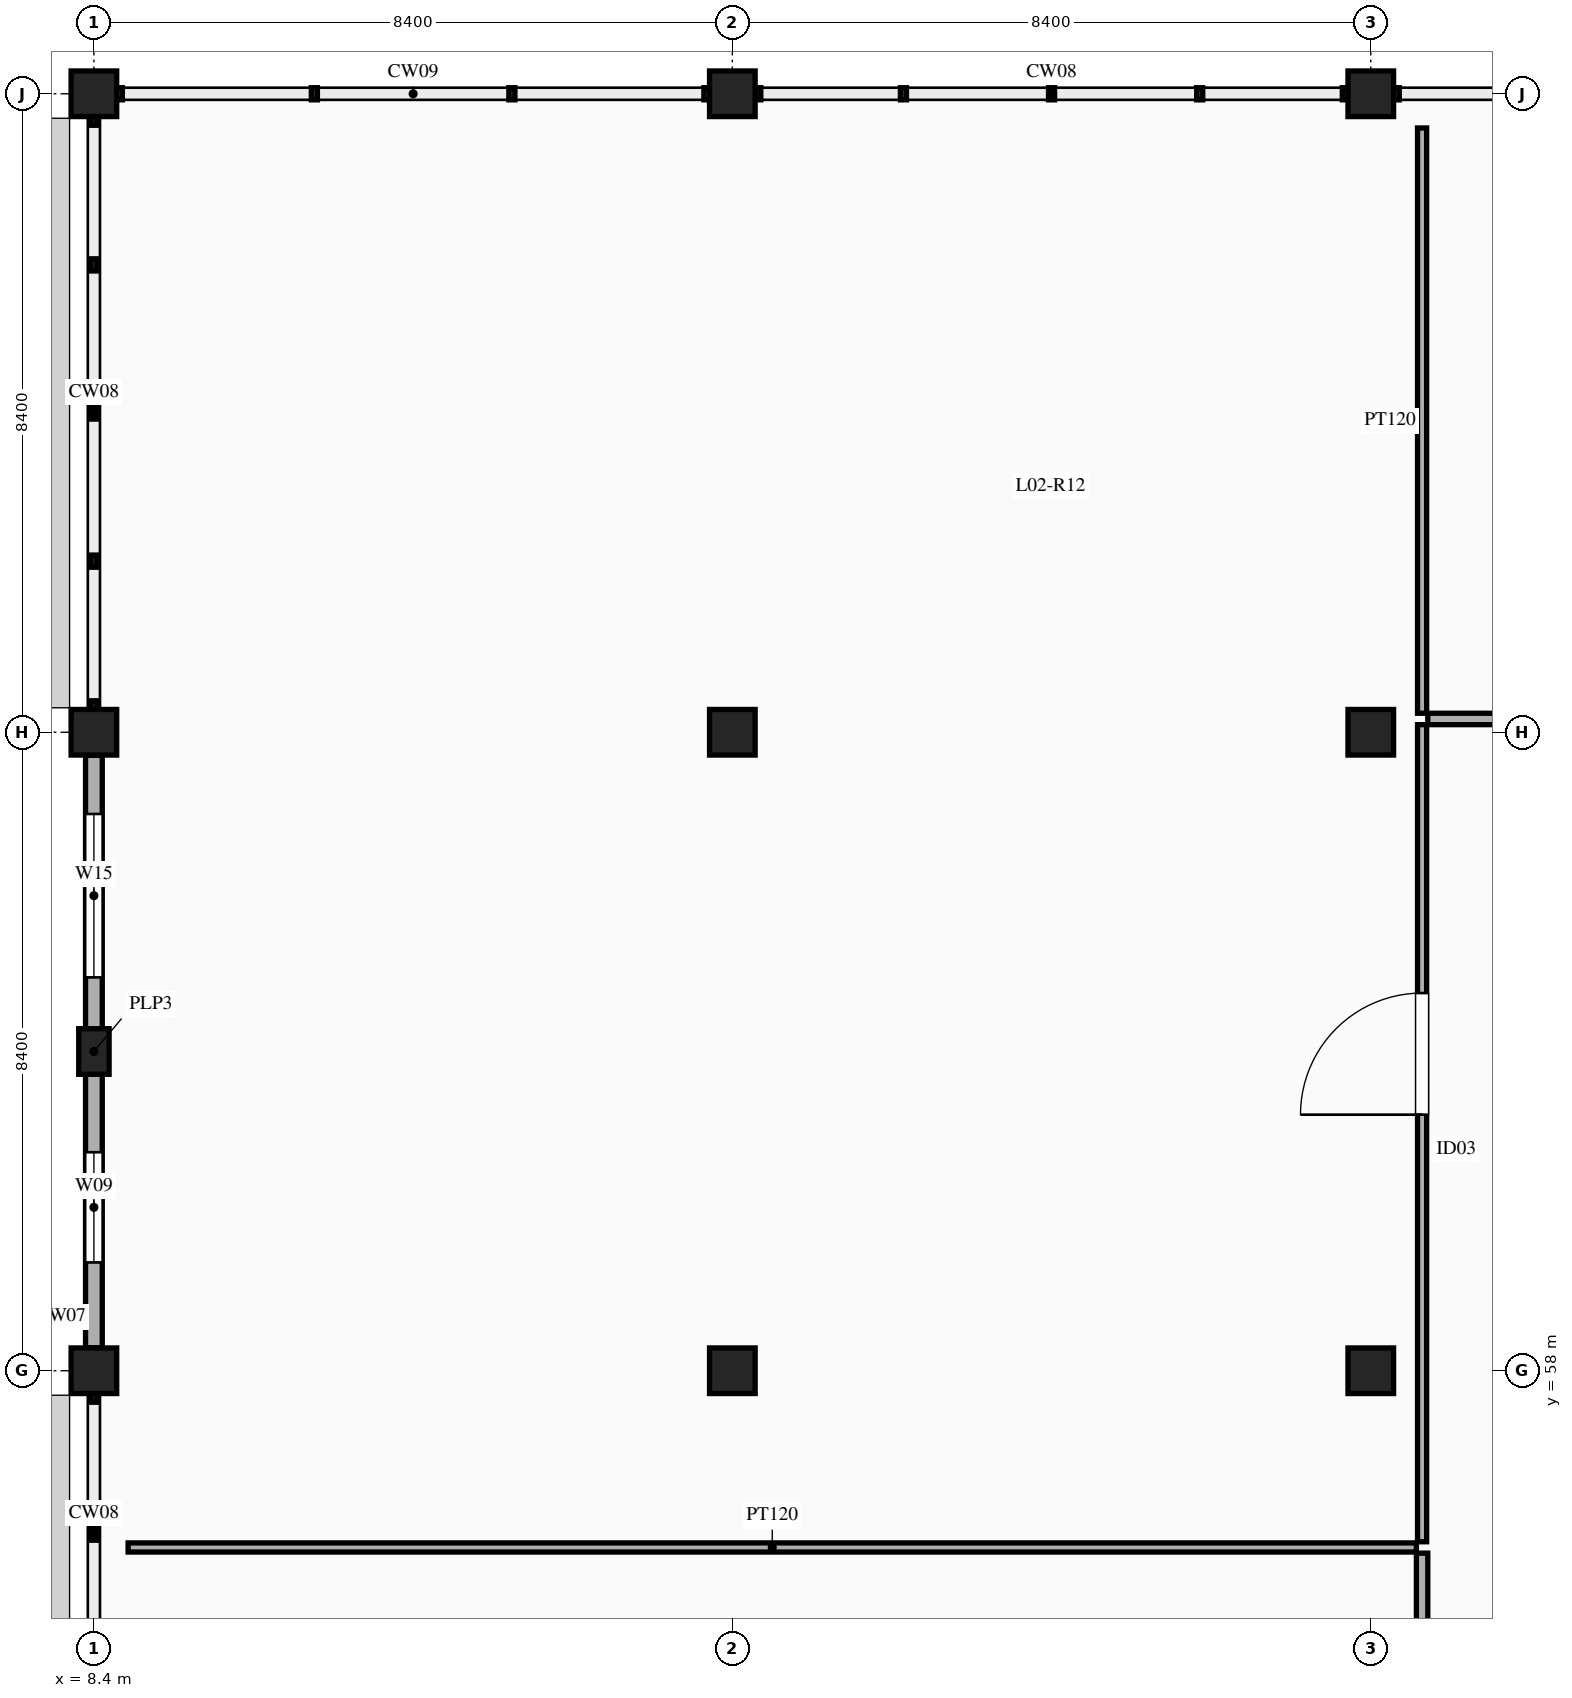
"""IFC4 building model, lengths in metres.
Left out: names, types, materials, properties, quantities, classifications, styles, units other than length and angle.
Written with IfcOpenShell. Run it as: python <this file> out.ifc"""

import sys

from ifc_helpers import new_model, si_unit, direction, frame, frame_2d, origin, origin_2d, place, context, subcontext, project, spatial, rectangle, extrude, element, fill, save


model = new_model("IFC4")
c1 = context("Model", 3, precision=1e-05, world=origin(), true_north=direction((0.0, 1.0)))
c2 = subcontext(c1, "Body", "Model", "MODEL_VIEW")
j1 = project(units=[si_unit("LENGTHUNIT", "METRE"), si_unit("PLANEANGLEUNIT", "RADIAN")], contexts=[c1])
p1 = place(None, origin())
s1 = spatial("IfcSite", under=j1, at=p1, CompositionType="ELEMENT")
p2 = place(p1, origin())
s2 = spatial("IfcBuilding", under=s1, at=p2, CompositionType="ELEMENT")
p3 = place(p2, frame((0.0, 0.0, 10.2)))
s3 = spatial("IfcBuildingStorey", under=s2, at=p3, CompositionType="ELEMENT", Elevation=10.2)
for number, where, z_axis, x_axis in (
    (1, (8.4, 58.0, 0.0), (0.0, 0.0, 1.0), (1.0, 0.0, 0.0)),
    (2, (8.4, 66.4, 0.0), (0.0, 0.0, 1.0), (1.0, 0.0, 0.0)),
    (3, (8.4, 74.8, 0.0), (0.0, 0.0, 1.0), (1.0, 0.0, 0.0)),
    (4, (16.8, 58.0, 0.0), (0.0, 0.0, 1.0), (1.0, 0.0, 0.0)),
    (5, (16.8, 66.4, 0.0), (0.0, 0.0, 1.0), (1.0, 0.0, 0.0)),
    (6, (16.8, 74.8, 0.0), (0.0, 0.0, 1.0), (1.0, 0.0, 0.0)),
    (7, (25.2, 58.0, 0.0), (0.0, 0.0, 1.0), (1.0, 0.0, 0.0)),
    (8, (25.2, 66.4, 0.0), (0.0, 0.0, 1.0), (1.0, 0.0, 0.0)),
    (9, (25.2, 74.8, 0.0), (0.0, 0.0, 1.0), (1.0, 0.0, 0.0)),
):
    element("IfcColumn", number, at=place(p3, frame(where, z_axis=z_axis, x_axis=x_axis)), inside=s3, PredefinedType="COLUMN", context=c2, shape_type="SweptSolid", body=[
        extrude(rectangle(XDim=0.6, YDim=0.6, at=origin_2d()), origin(), (0.0, 0.0, 1.0), 4.8),
    ])
p4 = place(p3, frame((8.4, 62.2, 0.0), z_axis=(0.0, 0.0, 1.0), x_axis=(1.0, 0.0, 0.0)))
e10 = element("IfcColumn", 10, at=p4, inside=s3, PredefinedType="PILASTER", context=c2, shape_type="SweptSolid", body=[
    extrude(rectangle(XDim=0.6, YDim=0.4, at=origin_2d()), origin(), (0.0, 0.0, 1.0), 4.8),
])
p5 = place(p3, frame((8.4, 58.302, 0.0), z_axis=(0.0, 0.0, 1.0), x_axis=(0.0, 1.0, 0.0)))
e11 = element("IfcWall", 11, at=p5, inside=s3, PredefinedType="USERDEFINED", context=c2, shape_type="SweptSolid", body=[
    extrude(rectangle(XDim=3.696, YDim=0.22, at=frame_2d((1.848, 0.0))), origin(), (0.0, 0.0, 1.0), 3.85),
])
p6 = place(p5, frame((1.123, 0.0, 0.9)))
e12 = element("IfcOpeningElement", 12, at=p6, cuts=e11, PredefinedType="OPENING", context=c2, shape_type="SweptSolid", body=[
    extrude(rectangle(XDim=1.45, YDim=1.8, at=frame_2d((0.725, 0.9))), frame((0.0, 0.12, 0.0), z_axis=(0.0, -1.0, 0.0), x_axis=(1.0, 0.0, 0.0)), (0.0, 0.0, 1.0), 0.24),
])
p7 = place(p3, frame((8.4, 62.402, 0.0), z_axis=(0.0, 0.0, 1.0), x_axis=(0.0, 1.0, 0.0)))
e13 = element("IfcWall", 13, at=p7, inside=s3, PredefinedType="USERDEFINED", context=c2, shape_type="SweptSolid", body=[
    extrude(rectangle(XDim=3.696, YDim=0.22, at=frame_2d((1.848, 0.0))), origin(), (0.0, 0.0, 1.0), 3.85),
])
p8 = place(p7, frame((0.773, 0.0, 1.1)))
e14 = element("IfcOpeningElement", 14, at=p8, cuts=e13, PredefinedType="OPENING", context=c2, shape_type="SweptSolid", body=[
    extrude(rectangle(XDim=2.15, YDim=2.15, at=frame_2d((1.075, 1.075))), frame((0.0, 0.12, 0.0), z_axis=(0.0, -1.0, 0.0), x_axis=(1.0, 0.0, 0.0)), (0.0, 0.0, 1.0), 0.24),
])
p9 = place(p3, frame((25.875, 36.95, 0.0), z_axis=(0.0, 0.0, 1.0), x_axis=(0.0, 1.0, 0.0)))
e15 = element("IfcWall", 15, at=p9, inside=s3, PredefinedType="PARTITIONING", context=c2, shape_type="SweptSolid", body=[
    extrude(rectangle(XDim=18.65, YDim=0.15, at=frame_2d((9.325, 0.0))), origin(), (0.0, 0.0, 1.0), 3.75),
])
p10 = place(p9, frame((15.963, 0.0, 0.0)))
e16 = element("IfcOpeningElement", 16, at=p10, cuts=e15, PredefinedType="OPENING", context=c2, shape_type="SweptSolid", body=[
    extrude(rectangle(XDim=1.24, YDim=2.2, at=frame_2d((0.62, 1.1))), frame((0.0, 0.085, 0.0), z_axis=(0.0, -1.0, 0.0), x_axis=(1.0, 0.0, 0.0)), (0.0, 0.0, 1.0), 0.17),
])
p11 = place(p3, frame((25.875, 55.75, 0.0), z_axis=(0.0, 0.0, 1.0), x_axis=(0.0, 1.0, 0.0)))
e17 = element("IfcWall", 17, at=p11, inside=s3, PredefinedType="PARTITIONING", context=c2, shape_type="SweptSolid", body=[
    extrude(rectangle(XDim=10.75, YDim=0.12, at=frame_2d((5.375, 0.0))), origin(), (0.0, 0.0, 1.0), 3.75),
])
p12 = place(p11, frame((5.619, 0.0, 0.0)))
e18 = element("IfcOpeningElement", 18, at=p12, cuts=e17, PredefinedType="OPENING", context=c2, shape_type="SweptSolid", body=[
    extrude(rectangle(XDim=1.6, YDim=2.35, at=frame_2d((0.8, 1.175))), frame((0.0, 0.07, 0.0), z_axis=(0.0, -1.0, 0.0), x_axis=(1.0, 0.0, 0.0)), (0.0, 0.0, 1.0), 0.14),
])
p13 = place(p3, frame((25.95, 66.575, 0.0), z_axis=(0.0, 0.0, 1.0), x_axis=(1.0, 0.0, 0.0)))
e19 = element("IfcWall", 19, at=p13, inside=s3, PredefinedType="PARTITIONING", context=c2, shape_type="SweptSolid", body=[
    extrude(rectangle(XDim=2.8, YDim=0.15, at=frame_2d((1.4, 0.0))), origin(), (0.0, 0.0, 1.0), 3.75),
])
p14 = place(p3, frame((8.85, 55.675, 0.0), z_axis=(0.0, 0.0, 1.0), x_axis=(1.0, 0.0, 0.0)))
e20 = element("IfcWall", 20, at=p14, inside=s3, PredefinedType="PARTITIONING", context=c2, shape_type="SweptSolid", body=[
    extrude(rectangle(XDim=16.95, YDim=0.12, at=frame_2d((8.475, 0.0))), origin(), (0.0, 0.0, 1.0), 3.75),
])
p15 = place(p3, frame((25.875, 66.65, 0.0), z_axis=(0.0, 0.0, 1.0), x_axis=(0.0, 1.0, 0.0)))
e21 = element("IfcWall", 21, at=p15, inside=s3, PredefinedType="PARTITIONING", context=c2, shape_type="SweptSolid", body=[
    extrude(rectangle(XDim=7.7, YDim=0.12, at=frame_2d((3.85, 0.0))), origin(), (0.0, 0.0, 1.0), 3.75),
])
p16 = place(p6, origin())
e22 = element("IfcWindow", 22, at=p16, inside=s3, PartitioningType="DOUBLE_PANEL_HORIZONTAL", PredefinedType="WINDOW", context=c2, shape_type="SweptSolid", body=[
    extrude(rectangle(XDim=1.45, YDim=1.8, at=frame_2d((0.725, 0.9))), frame((0.0, 0.03, 0.0), z_axis=(0.0, -1.0, 0.0), x_axis=(1.0, 0.0, 0.0)), (0.0, 0.0, 1.0), 0.06),
])
fill(e12, e22)
p17 = place(p8, origin())
e23 = element("IfcWindow", 23, at=p17, inside=s3, PartitioningType="TRIPLE_PANEL_VERTICAL", PredefinedType="WINDOW", context=c2, shape_type="SweptSolid", body=[
    extrude(rectangle(XDim=2.15, YDim=2.15, at=frame_2d((1.075, 1.075))), frame((0.0, 0.03, 0.0), z_axis=(0.0, -1.0, 0.0), x_axis=(1.0, 0.0, 0.0)), (0.0, 0.0, 1.0), 0.06),
])
fill(e14, e23)
p18 = place(p12, origin())
e24 = element("IfcDoor", 24, at=p18, inside=s3, OperationType="SINGLE_SWING_LEFT", PredefinedType="DOOR", context=c2, shape_type="SweptSolid", body=[
    extrude(rectangle(XDim=1.6, YDim=2.35, at=frame_2d((0.8, 1.175))), frame((0.0, 0.025, 0.0), z_axis=(0.0, -1.0, 0.0), x_axis=(1.0, 0.0, 0.0)), (0.0, 0.0, 1.0), 0.05),
])
fill(e18, e24)
save(model, sys.argv[1])
